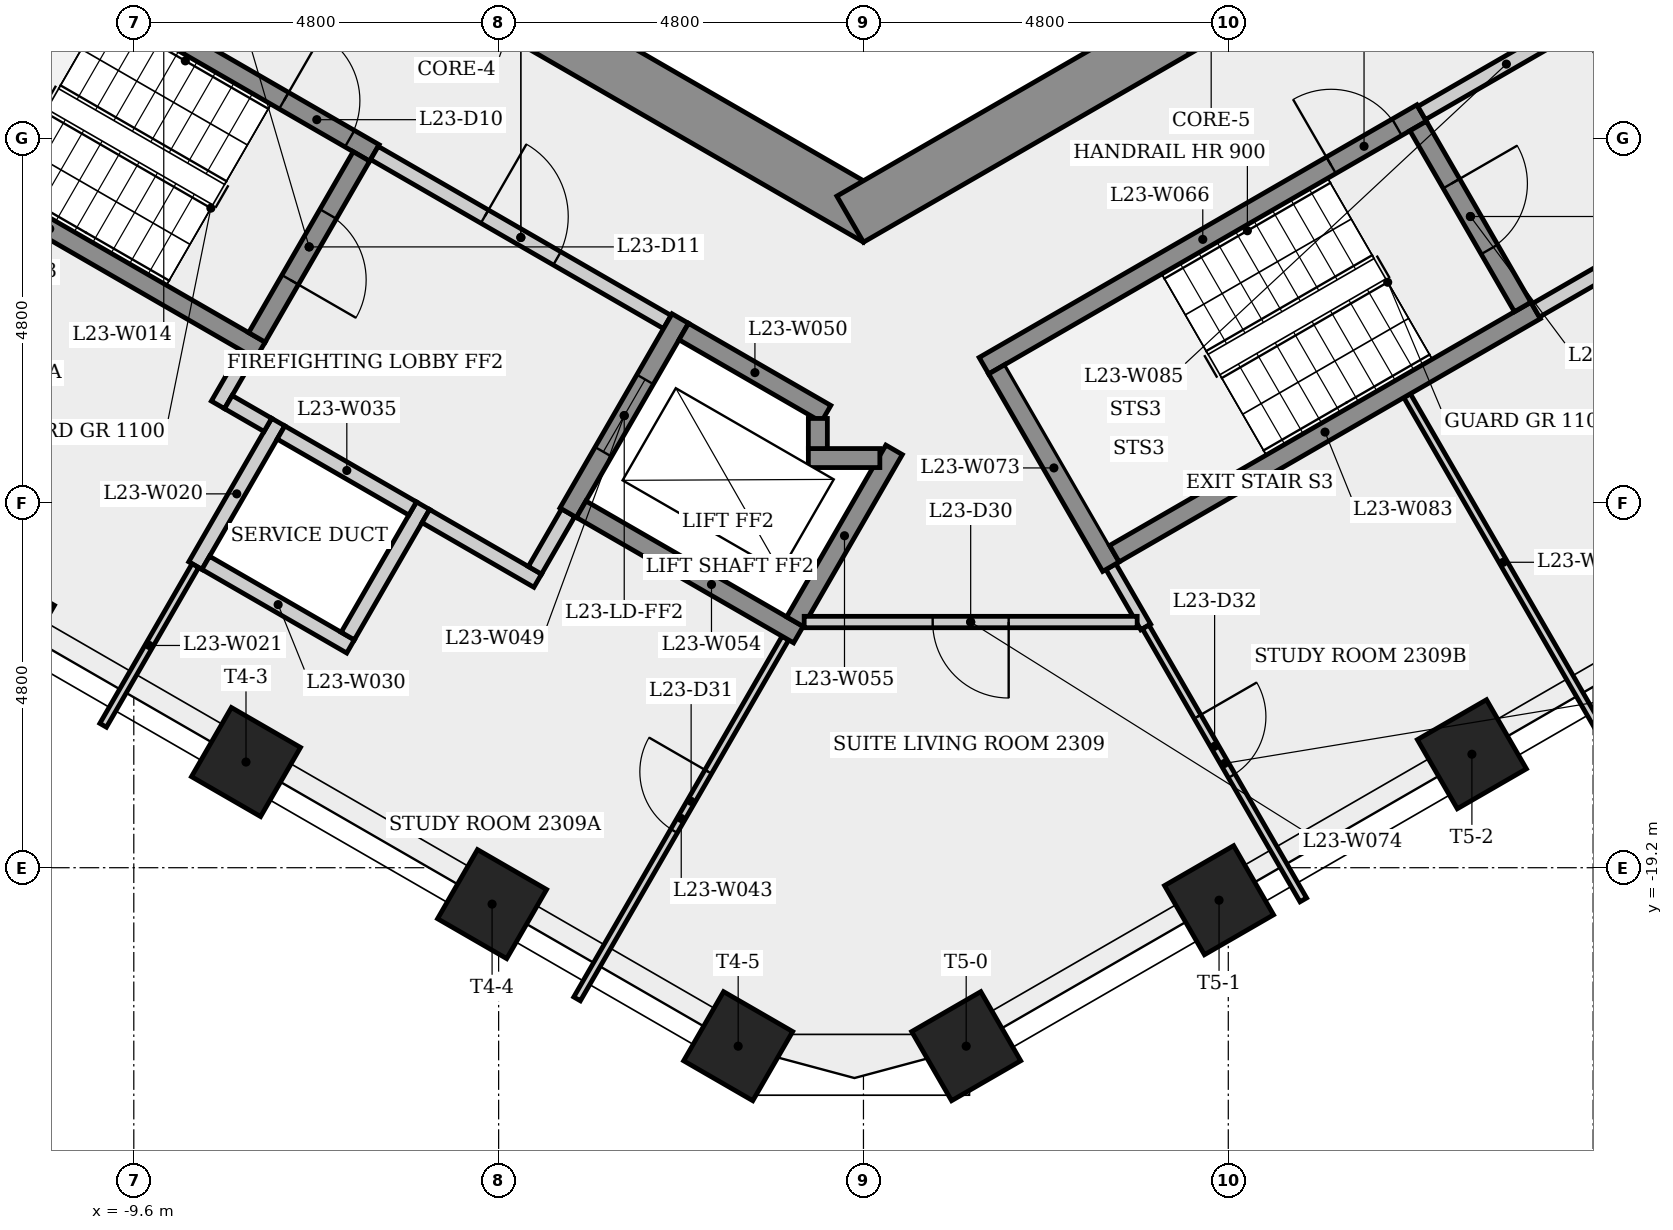
"""IFC4 building model, lengths in metres.
Left out: names, types, materials, properties, quantities, classifications, styles, units other than length and angle.
Written with IfcOpenShell. Run it as: python <this file> out.ifc"""

import sys

from ifc_helpers import new_model, si_unit, direction, frame, frame_2d, origin, origin_2d, place, context, subcontext, project, spatial, rectangle, extrude, element, fill, save


model = new_model("IFC4")
c1 = context("Model", 3, precision=1e-05, world=origin(), true_north=direction((0.0, 1.0)))
c2 = subcontext(c1, "Body", "Model", "MODEL_VIEW")
j1 = project(units=[si_unit("LENGTHUNIT", "METRE"), si_unit("PLANEANGLEUNIT", "RADIAN")], contexts=[c1])
p1 = place(None, origin())
s1 = spatial("IfcSite", under=j1, at=p1, CompositionType="ELEMENT")
p2 = place(p1, origin())
s2 = spatial("IfcBuilding", under=s1, at=p2, CompositionType="ELEMENT")
p3 = place(p2, frame((0.0, 0.0, 89.9)))
s3 = spatial("IfcBuildingStorey", under=s2, at=p3, CompositionType="ELEMENT", Elevation=89.9)
p4 = place(p3, frame((-9.325, -5.182, 0.0), z_axis=(0.0, 0.0, 1.0), x_axis=(0.866023993627, -0.500002442456, 0.0)))
e1 = element("IfcWall", 1, at=p4, inside=s3, PredefinedType="SHEAR", context=c2, shape_type="SweptSolid", body=[
    extrude(rectangle(XDim=10.97, YDim=0.7, at=frame_2d((5.485, 0.0))), origin(), (0.0, 0.0, 1.0), 3.4),
])
p5 = place(p4, frame((2.163, 0.0, 0.0)))
e2 = element("IfcOpeningElement", 2, at=p5, cuts=e1, PredefinedType="OPENING", context=c2, shape_type="SweptSolid", body=[
    extrude(rectangle(XDim=0.9, YDim=2.1, at=frame_2d((0.45, 1.05))), frame((0.0, 0.36, 0.0), z_axis=(0.0, -1.0, 0.0), x_axis=(1.0, 0.0, 0.0)), (0.0, 0.0, 1.0), 0.72),
])
p6 = place(p3, frame((-0.175, -10.667, 0.0), z_axis=(0.0, 0.0, 1.0), x_axis=(0.866023993627, 0.500002442456, 0.0)))
e3 = element("IfcWall", 3, at=p6, inside=s3, PredefinedType="SHEAR", context=c2, shape_type="SweptSolid", body=[
    extrude(rectangle(XDim=10.97, YDim=0.7, at=frame_2d((5.485, 0.0))), origin(), (0.0, 0.0, 1.0), 3.4),
])
p7 = place(p6, frame((4.943, 0.0, 0.0)))
e4 = element("IfcOpeningElement", 4, at=p7, cuts=e3, PredefinedType="OPENING", context=c2, shape_type="SweptSolid", body=[
    extrude(rectangle(XDim=0.9, YDim=2.1, at=frame_2d((0.45, 1.05))), frame((0.0, 0.36, 0.0), z_axis=(0.0, -1.0, 0.0), x_axis=(1.0, 0.0, 0.0)), (0.0, 0.0, 1.0), 0.72),
])
for number, where, z_axis, x_axis in (
    (5, (-11.362, -15.94, 0.0), (0.0, 0.0, 1.0), (-0.5, -0.866, 0.0)),
    (6, (-8.124, -17.81, 0.0), (0.0, 0.0, 1.0), (-0.5, -0.866, 0.0)),
    (7, (-4.886, -19.679, 0.0), (0.0, 0.0, 1.0), (-0.5, -0.866, 0.0)),
    (8, (-1.648, -21.548, 0.0), (0.0, 0.0, 1.0), (-0.5, -0.866, 0.0)),
    (9, (1.352, -21.548, 0.0), (0.0, 0.0, 1.0), (0.5, -0.866, 0.0)),
    (10, (4.678, -19.628, 0.0), (0.0, 0.0, 1.0), (0.5, -0.866, 0.0)),
    (11, (8.005, -17.707, 0.0), (0.0, 0.0, 1.0), (0.5, -0.866, 0.0)),
):
    element("IfcColumn", number, at=place(p3, frame(where, z_axis=z_axis, x_axis=x_axis)), inside=s3, PredefinedType="COLUMN", context=c2, shape_type="SweptSolid", body=[
        extrude(rectangle(XDim=1.05, YDim=1.05, at=origin_2d()), origin(), (0.0, 0.0, 1.0), 3.4),
    ])
p8 = place(p3, frame((-11.977, -6.595, 0.0), z_axis=(0.0, 0.0, 1.0), x_axis=(0.866025499775, -0.499999833739, 0.0)))
e12 = element("IfcWall", 12, at=p8, inside=s3, PredefinedType="SHEAR", context=c2, shape_type="SweptSolid", body=[
    extrude(rectangle(XDim=6.4, YDim=0.25, at=frame_2d((3.2, 0.0))), origin(), (0.0, 0.0, 1.0), 3.05),
])
p9 = place(p8, frame((5.025, 0.0, 0.0)))
e13 = element("IfcOpeningElement", 13, at=p9, cuts=e12, PredefinedType="OPENING", context=c2, shape_type="SweptSolid", body=[
    extrude(rectangle(XDim=1.0, YDim=2.1, at=frame_2d((0.5, 1.05))), frame((0.0, 0.135, 0.0), z_axis=(0.0, -1.0, 0.0), x_axis=(1.0, 0.0, 0.0)), (0.0, 0.0, 1.0), 0.27),
])
p10 = place(p3, frame((-8.79, -15.225, 0.0), z_axis=(0.0, 0.0, 1.0), x_axis=(0.500016430238, 0.866015917575, 0.0)))
e14 = element("IfcWall", 14, at=p10, inside=s3, PredefinedType="PLUMBINGWALL", context=c2, shape_type="SweptSolid", body=[
    extrude(rectangle(XDim=2.181, YDim=0.2, at=frame_2d((1.09, 0.0))), origin(), (0.0, 0.0, 1.0), 3.05),
])
p11 = place(p3, frame((-8.79, -15.225, 0.0), z_axis=(0.0, 0.0, 1.0), x_axis=(-0.50002442115, -0.866011303768, 0.0)))
e15 = element("IfcWall", 15, at=p11, inside=s3, PredefinedType="PARTITIONING", context=c2, shape_type="SweptSolid", body=[
    extrude(rectangle(XDim=2.426, YDim=0.1, at=frame_2d((1.213, 0.0))), origin(), (0.0, 0.0, 1.0), 3.05),
])
p12 = place(p3, frame((-8.493, -13.11, 0.0), z_axis=(0.0, 0.0, 1.0), x_axis=(0.500067724834, 0.865986299303, 0.0)))
e16 = element("IfcWall", 16, at=p12, inside=s3, PredefinedType="PARTITIONING", context=c2, shape_type="SweptSolid", body=[
    extrude(rectangle(XDim=0.775, YDim=0.2, at=frame_2d((0.388, 0.0))), origin(), (0.0, 0.0, 1.0), 3.05),
])
p13 = place(p3, frame((-7.935, -12.393, 0.0), z_axis=(0.0, 0.0, 1.0), x_axis=(-0.866025499775, 0.499999833739, 0.0)))
e17 = element("IfcWall", 17, at=p13, inside=s3, PredefinedType="SHEAR", context=c2, shape_type="SweptSolid", body=[
    extrude(rectangle(XDim=6.4, YDim=0.25, at=frame_2d((3.2, 0.0))), origin(), (0.0, 0.0, 1.0), 3.05),
])
p14 = place(p3, frame((-7.836, -13.373, 0.0), z_axis=(0.0, 0.0, 1.0), x_axis=(-0.866232998003, 0.499640263761, 0.0)))
e18 = element("IfcWall", 18, at=p14, inside=s3, PredefinedType="PARTITIONING", context=c2, shape_type="SweptSolid", body=[
    extrude(rectangle(XDim=0.6, YDim=0.2, at=frame_2d((0.3, 0.0))), origin(), (0.0, 0.0, 1.0), 3.05),
])
p15 = place(p3, frame((-6.748, -16.289, 0.0), z_axis=(0.0, 0.0, 1.0), x_axis=(-0.866035918664, 0.499981787252, 0.0)))
e19 = element("IfcWall", 19, at=p15, inside=s3, PredefinedType="PLUMBINGWALL", context=c2, shape_type="SweptSolid", body=[
    extrude(rectangle(XDim=2.2, YDim=0.2, at=frame_2d((1.1, 0.0))), origin(), (0.0, 0.0, 1.0), 3.05),
])
p16 = place(p3, frame((-6.605, -9.841, 0.0), z_axis=(0.0, 0.0, 1.0), x_axis=(-0.499996545922, -0.866027397988, 0.0)))
e20 = element("IfcWall", 20, at=p16, inside=s3, PredefinedType="SHEAR", context=c2, shape_type="SweptSolid", body=[
    extrude(rectangle(XDim=2.75, YDim=0.25, at=frame_2d((1.375, 0.0))), origin(), (0.0, 0.0, 1.0), 3.05),
])
p17 = place(p16, frame((0.875, 0.0, 0.0)))
e21 = element("IfcOpeningElement", 21, at=p17, cuts=e20, PredefinedType="OPENING", context=c2, shape_type="SweptSolid", body=[
    extrude(rectangle(XDim=1.0, YDim=2.1, at=frame_2d((0.5, 1.05))), frame((0.0, 0.135, 0.0), z_axis=(0.0, -1.0, 0.0), x_axis=(1.0, 0.0, 0.0)), (0.0, 0.0, 1.0), 0.27),
])
p18 = place(p3, frame((-6.435, -9.795, 0.0), z_axis=(0.0, 0.0, 1.0), x_axis=(0.866012907634, -0.500021643343, 0.0)))
e22 = element("IfcWall", 22, at=p18, inside=s3, PredefinedType="PARTITIONING", context=c2, shape_type="SweptSolid", body=[
    extrude(rectangle(XDim=4.45, YDim=0.2, at=frame_2d((2.225, 0.0))), origin(), (0.0, 0.0, 1.0), 3.05),
])
p19 = place(p18, frame((1.675, 0.0, 0.0)))
e23 = element("IfcOpeningElement", 23, at=p19, cuts=e22, PredefinedType="OPENING", context=c2, shape_type="SweptSolid", body=[
    extrude(rectangle(XDim=1.1, YDim=2.1, at=frame_2d((0.55, 1.05))), frame((0.0, 0.11, 0.0), z_axis=(0.0, -1.0, 0.0), x_axis=(1.0, 0.0, 0.0)), (0.0, 0.0, 1.0), 0.22),
])
p20 = place(p3, frame((-5.795, -14.437, 0.0), z_axis=(0.0, 0.0, 1.0), x_axis=(-0.499957196903, -0.866050114754, 0.0)))
e24 = element("IfcWall", 24, at=p20, inside=s3, PredefinedType="PLUMBINGWALL", context=c2, shape_type="SweptSolid", body=[
    extrude(rectangle(XDim=1.981, YDim=0.2, at=frame_2d((0.99, 0.0))), origin(), (0.0, 0.0, 1.0), 3.05),
])
p21 = place(p3, frame((-5.931, -14.473, 0.0), z_axis=(0.0, 0.0, 1.0), x_axis=(-0.866041268327, 0.499972520799, 0.0)))
e25 = element("IfcWall", 25, at=p21, inside=s3, PredefinedType="PLUMBINGWALL", context=c2, shape_type="SweptSolid", body=[
    extrude(rectangle(XDim=2.0, YDim=0.2, at=frame_2d((1.0, 0.0))), origin(), (0.0, 0.0, 1.0), 3.05),
])
p22 = place(p3, frame((-4.286, -15.423, 0.0), z_axis=(0.0, 0.0, 1.0), x_axis=(-0.866025371046, 0.500000056704, 0.0)))
e26 = element("IfcWall", 26, at=p22, inside=s3, PredefinedType="PARTITIONING", context=c2, shape_type="SweptSolid", body=[
    extrude(rectangle(XDim=1.7, YDim=0.2, at=frame_2d((0.85, 0.0))), origin(), (0.0, 0.0, 1.0), 3.05),
])
p23 = place(p3, frame((-3.885, -14.529, 0.0), z_axis=(0.0, 0.0, 1.0), x_axis=(-0.499859285417, -0.866106630146, 0.0)))
e27 = element("IfcWall", 27, at=p23, inside=s3, PredefinedType="PARTITIONING", context=c2, shape_type="SweptSolid", body=[
    extrude(rectangle(XDim=0.875, YDim=0.2, at=frame_2d((0.438, 0.0))), origin(), (0.0, 0.0, 1.0), 3.05),
])
p24 = place(p3, frame((-3.768, -20.926, 0.0), z_axis=(0.0, 0.0, 1.0), x_axis=(0.499980760091, 0.866036511666, 0.0)))
e28 = element("IfcWall", 28, at=p24, inside=s3, PredefinedType="PARTITIONING", context=c2, shape_type="SweptSolid", body=[
    extrude(rectangle(XDim=5.482, YDim=0.1, at=frame_2d((2.741, 0.0))), origin(), (0.0, 0.0, 1.0), 3.05),
])
p25 = place(p24, frame((2.551, 0.0, 0.0)))
e29 = element("IfcOpeningElement", 29, at=p25, cuts=e28, PredefinedType="OPENING", context=c2, shape_type="SweptSolid", body=[
    extrude(rectangle(XDim=0.9, YDim=2.1, at=frame_2d((0.45, 1.05))), frame((0.0, 0.06, 0.0), z_axis=(0.0, -1.0, 0.0), x_axis=(1.0, 0.0, 0.0)), (0.0, 0.0, 1.0), 0.12),
])
p26 = place(p3, frame((-2.41, -11.974, 0.0), z_axis=(0.0, 0.0, 1.0), x_axis=(-0.500001826776, -0.866024349092, 0.0)))
e30 = element("IfcWall", 30, at=p26, inside=s3, PredefinedType="SHEAR", context=c2, shape_type="SweptSolid", body=[
    extrude(rectangle(XDim=2.95, YDim=0.25, at=frame_2d((1.475, 0.0))), origin(), (0.0, 0.0, 1.0), 3.05),
])
p27 = place(p26, frame((0.925, 0.0, 0.0)))
e31 = element("IfcOpeningElement", 31, at=p27, cuts=e30, PredefinedType="OPENING", context=c2, shape_type="SweptSolid", body=[
    extrude(rectangle(XDim=1.1, YDim=2.1, at=frame_2d((0.55, 1.05))), frame((0.0, 0.135, 0.0), z_axis=(0.0, -1.0, 0.0), x_axis=(1.0, 0.0, 0.0)), (0.0, 0.0, 1.0), 0.27),
])
p28 = place(p3, frame((-2.364, -12.145, 0.0), z_axis=(0.0, 0.0, 1.0), x_axis=(0.86603892542, -0.499976579108, 0.0)))
e32 = element("IfcWall", 32, at=p28, inside=s3, PredefinedType="SHEAR", context=c2, shape_type="SweptSolid", body=[
    extrude(rectangle(XDim=2.162, YDim=0.25, at=frame_2d((1.081, 0.0))), origin(), (0.0, 0.0, 1.0), 3.05),
])
p29 = place(p3, frame((-0.856, -16.133, 0.0), z_axis=(0.0, 0.0, 1.0), x_axis=(-0.866021716278, 0.500006386895, 0.0)))
e33 = element("IfcWall", 33, at=p29, inside=s3, PredefinedType="SHEAR", context=c2, shape_type="SweptSolid", body=[
    extrude(rectangle(XDim=3.3, YDim=0.25, at=frame_2d((1.65, 0.0))), origin(), (0.0, 0.0, 1.0), 3.05),
])
p30 = place(p3, frame((-0.902, -15.962, 0.0), z_axis=(0.0, 0.0, 1.0), x_axis=(0.499981517636, 0.866036074319, 0.0)))
e34 = element("IfcWall", 34, at=p30, inside=s3, PredefinedType="SHEAR", context=c2, shape_type="SweptSolid", body=[
    extrude(rectangle(XDim=2.61, YDim=0.25, at=frame_2d((1.305, 0.0))), origin(), (0.0, 0.0, 1.0), 3.05),
])
p31 = place(p3, frame((-0.725, -13.81, 0.0), z_axis=(0.0, 0.0, 1.0), x_axis=(1.0, 0.0, 0.0)))
e35 = element("IfcWall", 35, at=p31, inside=s3, PredefinedType="SHEAR", context=c2, shape_type="SweptSolid", body=[
    extrude(rectangle(XDim=0.941, YDim=0.25, at=frame_2d((0.47, 0.0))), origin(), (0.0, 0.0, 1.0), 3.4),
])
p32 = place(p3, frame((-0.6, -13.289, 0.0), z_axis=(0.0, 0.0, 1.0), x_axis=(0.0, -1.0, 0.0)))
e36 = element("IfcWall", 36, at=p32, inside=s3, PredefinedType="SHEAR", context=c2, shape_type="SweptSolid", body=[
    extrude(rectangle(XDim=0.396, YDim=0.25, at=frame_2d((0.198, 0.0))), origin(), (0.0, 0.0, 1.0), 3.4),
])
p33 = place(p3, frame((1.585, -12.595, 0.0), z_axis=(0.0, 0.0, 1.0), x_axis=(0.866036417653, 0.499980922934, 0.0)))
e37 = element("IfcWall", 37, at=p33, inside=s3, PredefinedType="SHEAR", context=c2, shape_type="SweptSolid", body=[
    extrude(rectangle(XDim=6.65, YDim=0.25, at=frame_2d((3.325, 0.0))), origin(), (0.0, 0.0, 1.0), 3.05),
])
p34 = place(p33, frame((5.275, 0.0, 0.0)))
e38 = element("IfcOpeningElement", 38, at=p34, cuts=e37, PredefinedType="OPENING", context=c2, shape_type="SweptSolid", body=[
    extrude(rectangle(XDim=1.0, YDim=2.1, at=frame_2d((0.5, 1.05))), frame((0.0, 0.135, 0.0), z_axis=(0.0, -1.0, 0.0), x_axis=(1.0, 0.0, 0.0)), (0.0, 0.0, 1.0), 0.27),
])
p35 = place(p3, frame((3.256, -15.239, 0.0), z_axis=(0.0, 0.0, 1.0), x_axis=(0.499922376475, -0.866070215109, 0.0)))
e39 = element("IfcWall", 39, at=p35, inside=s3, PredefinedType="PARTITIONING", context=c2, shape_type="SweptSolid", body=[
    extrude(rectangle(XDim=0.916, YDim=0.15, at=frame_2d((0.458, 0.0))), origin(), (0.0, 0.0, 1.0), 3.05),
])
p36 = place(p3, frame((3.256, -15.239, 0.0), z_axis=(0.0, 0.0, 1.0), x_axis=(-0.50002537861, 0.866010750942, 0.0)))
e40 = element("IfcWall", 40, at=p36, inside=s3, PredefinedType="SHEAR", context=c2, shape_type="SweptSolid", body=[
    extrude(rectangle(XDim=3.0, YDim=0.25, at=frame_2d((1.5, 0.0))), origin(), (0.0, 0.0, 1.0), 3.05),
])
p37 = place(p3, frame((3.601, -15.967, 0.0), z_axis=(0.0, 0.0, 1.0), x_axis=(-1.0, 0.0, 0.0)))
e41 = element("IfcWall", 41, at=p37, inside=s3, PredefinedType="PARTITIONING", context=c2, shape_type="SweptSolid", body=[
    extrude(rectangle(XDim=4.381, YDim=0.15, at=frame_2d((2.19, 0.0))), origin(), (0.0, 0.0, 1.0), 3.05),
])
p38 = place(p37, frame((1.691, 0.0, 0.0)))
e42 = element("IfcOpeningElement", 42, at=p38, cuts=e41, PredefinedType="OPENING", context=c2, shape_type="SweptSolid", body=[
    extrude(rectangle(XDim=1.0, YDim=2.1, at=frame_2d((0.5, 1.05))), frame((0.0, 0.085, 0.0), z_axis=(0.0, -1.0, 0.0), x_axis=(1.0, 0.0, 0.0)), (0.0, 0.0, 1.0), 0.17),
])
p39 = place(p3, frame((3.714, -16.032, 0.0), z_axis=(0.0, 0.0, 1.0), x_axis=(0.500033333293, -0.866006157943, 0.0)))
e43 = element("IfcWall", 43, at=p39, inside=s3, PredefinedType="PARTITIONING", context=c2, shape_type="SweptSolid", body=[
    extrude(rectangle(XDim=4.147, YDim=0.1, at=frame_2d((2.073, 0.0))), origin(), (0.0, 0.0, 1.0), 3.05),
])
p40 = place(p39, frame((1.363, 0.0, 0.0)))
e44 = element("IfcOpeningElement", 44, at=p40, cuts=e43, PredefinedType="OPENING", context=c2, shape_type="SweptSolid", body=[
    extrude(rectangle(XDim=0.9, YDim=2.1, at=frame_2d((0.45, 1.05))), frame((0.0, 0.06, 0.0), z_axis=(0.0, -1.0, 0.0), x_axis=(1.0, 0.0, 0.0)), (0.0, 0.0, 1.0), 0.12),
])
p41 = place(p3, frame((7.153, -12.989, 0.0), z_axis=(0.0, 0.0, 1.0), x_axis=(0.500013255511, -0.866017750576, 0.0)))
e45 = element("IfcWall", 45, at=p41, inside=s3, PredefinedType="PARTITIONING", context=c2, shape_type="SweptSolid", body=[
    extrude(rectangle(XDim=5.063, YDim=0.1, at=frame_2d((2.531, 0.0))), origin(), (0.0, 0.0, 1.0), 3.05),
])
p42 = place(p3, frame((3.301, -15.068, 0.0), z_axis=(0.0, 0.0, 1.0), x_axis=(0.866035036182, 0.499983315828, 0.0)))
e46 = element("IfcWall", 46, at=p42, inside=s3, PredefinedType="SHEAR", context=c2, shape_type="SweptSolid", body=[
    extrude(rectangle(XDim=6.4, YDim=0.25, at=frame_2d((3.2, 0.0))), origin(), (0.0, 0.0, 1.0), 3.05),
])
p43 = place(p3, frame((7.298, -9.441, 0.0), z_axis=(0.0, 0.0, 1.0), x_axis=(0.500034990121, -0.866005201286, 0.0)))
e47 = element("IfcWall", 47, at=p43, inside=s3, PredefinedType="SHEAR", context=c2, shape_type="SweptSolid", body=[
    extrude(rectangle(XDim=2.75, YDim=0.25, at=frame_2d((1.375, 0.0))), origin(), (0.0, 0.0, 1.0), 3.05),
])
p44 = place(p43, frame((0.875, 0.0, 0.0)))
e48 = element("IfcOpeningElement", 48, at=p44, cuts=e47, PredefinedType="OPENING", context=c2, shape_type="SweptSolid", body=[
    extrude(rectangle(XDim=1.0, YDim=2.1, at=frame_2d((0.5, 1.05))), frame((0.0, 0.135, 0.0), z_axis=(0.0, -1.0, 0.0), x_axis=(1.0, 0.0, 0.0)), (0.0, 0.0, 1.0), 0.27),
])
p45 = place(p3, frame((7.344, -9.27, 0.0), z_axis=(0.0, 0.0, 1.0), x_axis=(0.866005588531, 0.500034319456, 0.0)))
e49 = element("IfcWall", 49, at=p45, inside=s3, PredefinedType="PARTITIONING", context=c2, shape_type="SweptSolid", body=[
    extrude(rectangle(XDim=2.575, YDim=0.2, at=frame_2d((1.288, 0.0))), origin(), (0.0, 0.0, 1.0), 3.05),
])
p46 = place(p3, frame((9.537, -8.119, 0.0), z_axis=(0.0, 0.0, 1.0), x_axis=(0.499990139034, -0.866031096941, 0.0)))
e50 = element("IfcWall", 50, at=p46, inside=s3, PredefinedType="PARTITIONING", context=c2, shape_type="SweptSolid", body=[
    extrude(rectangle(XDim=3.0, YDim=0.2, at=frame_2d((1.5, 0.0))), origin(), (0.0, 0.0, 1.0), 3.05),
])
p47 = place(p46, frame((0.935, 0.0, 0.0)))
e51 = element("IfcOpeningElement", 51, at=p47, cuts=e50, PredefinedType="OPENING", context=c2, shape_type="SweptSolid", body=[
    extrude(rectangle(XDim=1.0, YDim=2.1, at=frame_2d((0.5, 1.05))), frame((0.0, 0.11, 0.0), z_axis=(0.0, -1.0, 0.0), x_axis=(1.0, 0.0, 0.0)), (0.0, 0.0, 1.0), 0.22),
])
p48 = place(p3, frame((10.901, -10.681, 0.0), z_axis=(0.0, 0.0, 1.0), x_axis=(-0.866007538022, -0.500030943131, 0.0)))
e52 = element("IfcWall", 52, at=p48, inside=s3, PredefinedType="PARTITIONING", context=c2, shape_type="SweptSolid", body=[
    extrude(rectangle(XDim=2.375, YDim=0.2, at=frame_2d((1.188, 0.0))), origin(), (0.0, 0.0, 1.0), 3.05),
])
p49 = place(p9, origin())
e53 = element("IfcDoor", 53, at=p49, inside=s3, OperationType="SINGLE_SWING_LEFT", PredefinedType="DOOR", context=c2, shape_type="SweptSolid", body=[
    extrude(rectangle(XDim=1.0, YDim=2.1, at=frame_2d((0.5, 1.05))), frame((0.0, 0.025, 0.0), z_axis=(0.0, -1.0, 0.0), x_axis=(1.0, 0.0, 0.0)), (0.0, 0.0, 1.0), 0.05),
])
fill(e13, e53)
p50 = place(p17, origin())
e54 = element("IfcDoor", 54, at=p50, inside=s3, OperationType="SINGLE_SWING_RIGHT", PredefinedType="DOOR", context=c2, shape_type="SweptSolid", body=[
    extrude(rectangle(XDim=1.0, YDim=2.1, at=frame_2d((0.5, 1.05))), frame((0.0, 0.025, 0.0), z_axis=(0.0, -1.0, 0.0), x_axis=(1.0, 0.0, 0.0)), (0.0, 0.0, 1.0), 0.05),
])
fill(e21, e54)
p51 = place(p19, origin())
e55 = element("IfcDoor", 55, at=p51, inside=s3, OperationType="SINGLE_SWING_LEFT", PredefinedType="DOOR", context=c2, shape_type="SweptSolid", body=[
    extrude(rectangle(XDim=1.1, YDim=2.1, at=frame_2d((0.55, 1.05))), frame((0.0, 0.025, 0.0), z_axis=(0.0, -1.0, 0.0), x_axis=(1.0, 0.0, 0.0)), (0.0, 0.0, 1.0), 0.05),
])
fill(e23, e55)
p52 = place(p27, origin())
e56 = element("IfcDoor", 56, at=p52, inside=s3, OperationType="SLIDING_TO_LEFT", PredefinedType="DOOR", context=c2, shape_type="SweptSolid", body=[
    extrude(rectangle(XDim=1.1, YDim=2.1, at=frame_2d((0.55, 1.05))), frame((0.0, 0.025, 0.0), z_axis=(0.0, -1.0, 0.0), x_axis=(1.0, 0.0, 0.0)), (0.0, 0.0, 1.0), 0.05),
])
fill(e31, e56)
p53 = place(p34, origin())
e57 = element("IfcDoor", 57, at=p53, inside=s3, OperationType="SINGLE_SWING_LEFT", PredefinedType="DOOR", context=c2, shape_type="SweptSolid", body=[
    extrude(rectangle(XDim=1.0, YDim=2.1, at=frame_2d((0.5, 1.05))), frame((0.0, 0.025, 0.0), z_axis=(0.0, -1.0, 0.0), x_axis=(1.0, 0.0, 0.0)), (0.0, 0.0, 1.0), 0.05),
])
fill(e38, e57)
p54 = place(p44, origin())
e58 = element("IfcDoor", 58, at=p54, inside=s3, OperationType="SINGLE_SWING_LEFT", PredefinedType="DOOR", context=c2, shape_type="SweptSolid", body=[
    extrude(rectangle(XDim=1.0, YDim=2.1, at=frame_2d((0.5, 1.05))), frame((0.0, 0.025, 0.0), z_axis=(0.0, -1.0, 0.0), x_axis=(1.0, 0.0, 0.0)), (0.0, 0.0, 1.0), 0.05),
])
fill(e48, e58)
p55 = place(p38, origin())
e59 = element("IfcDoor", 59, at=p55, inside=s3, OperationType="SINGLE_SWING_LEFT", PredefinedType="DOOR", context=c2, shape_type="SweptSolid", body=[
    extrude(rectangle(XDim=1.0, YDim=2.1, at=frame_2d((0.5, 1.05))), frame((0.0, 0.025, 0.0), z_axis=(0.0, -1.0, 0.0), x_axis=(1.0, 0.0, 0.0)), (0.0, 0.0, 1.0), 0.05),
])
fill(e42, e59)
p56 = place(p25, origin())
e60 = element("IfcDoor", 60, at=p56, inside=s3, OperationType="SINGLE_SWING_RIGHT", PredefinedType="DOOR", context=c2, shape_type="SweptSolid", body=[
    extrude(rectangle(XDim=0.9, YDim=2.1, at=frame_2d((0.45, 1.05))), frame((0.0, 0.025, 0.0), z_axis=(0.0, -1.0, 0.0), x_axis=(1.0, 0.0, 0.0)), (0.0, 0.0, 1.0), 0.05),
])
fill(e29, e60)
p57 = place(p40, origin())
e61 = element("IfcDoor", 61, at=p57, inside=s3, OperationType="SINGLE_SWING_LEFT", PredefinedType="DOOR", context=c2, shape_type="SweptSolid", body=[
    extrude(rectangle(XDim=0.9, YDim=2.1, at=frame_2d((0.45, 1.05))), frame((0.0, 0.025, 0.0), z_axis=(0.0, -1.0, 0.0), x_axis=(1.0, 0.0, 0.0)), (0.0, 0.0, 1.0), 0.05),
])
fill(e44, e61)
save(model, sys.argv[1])
